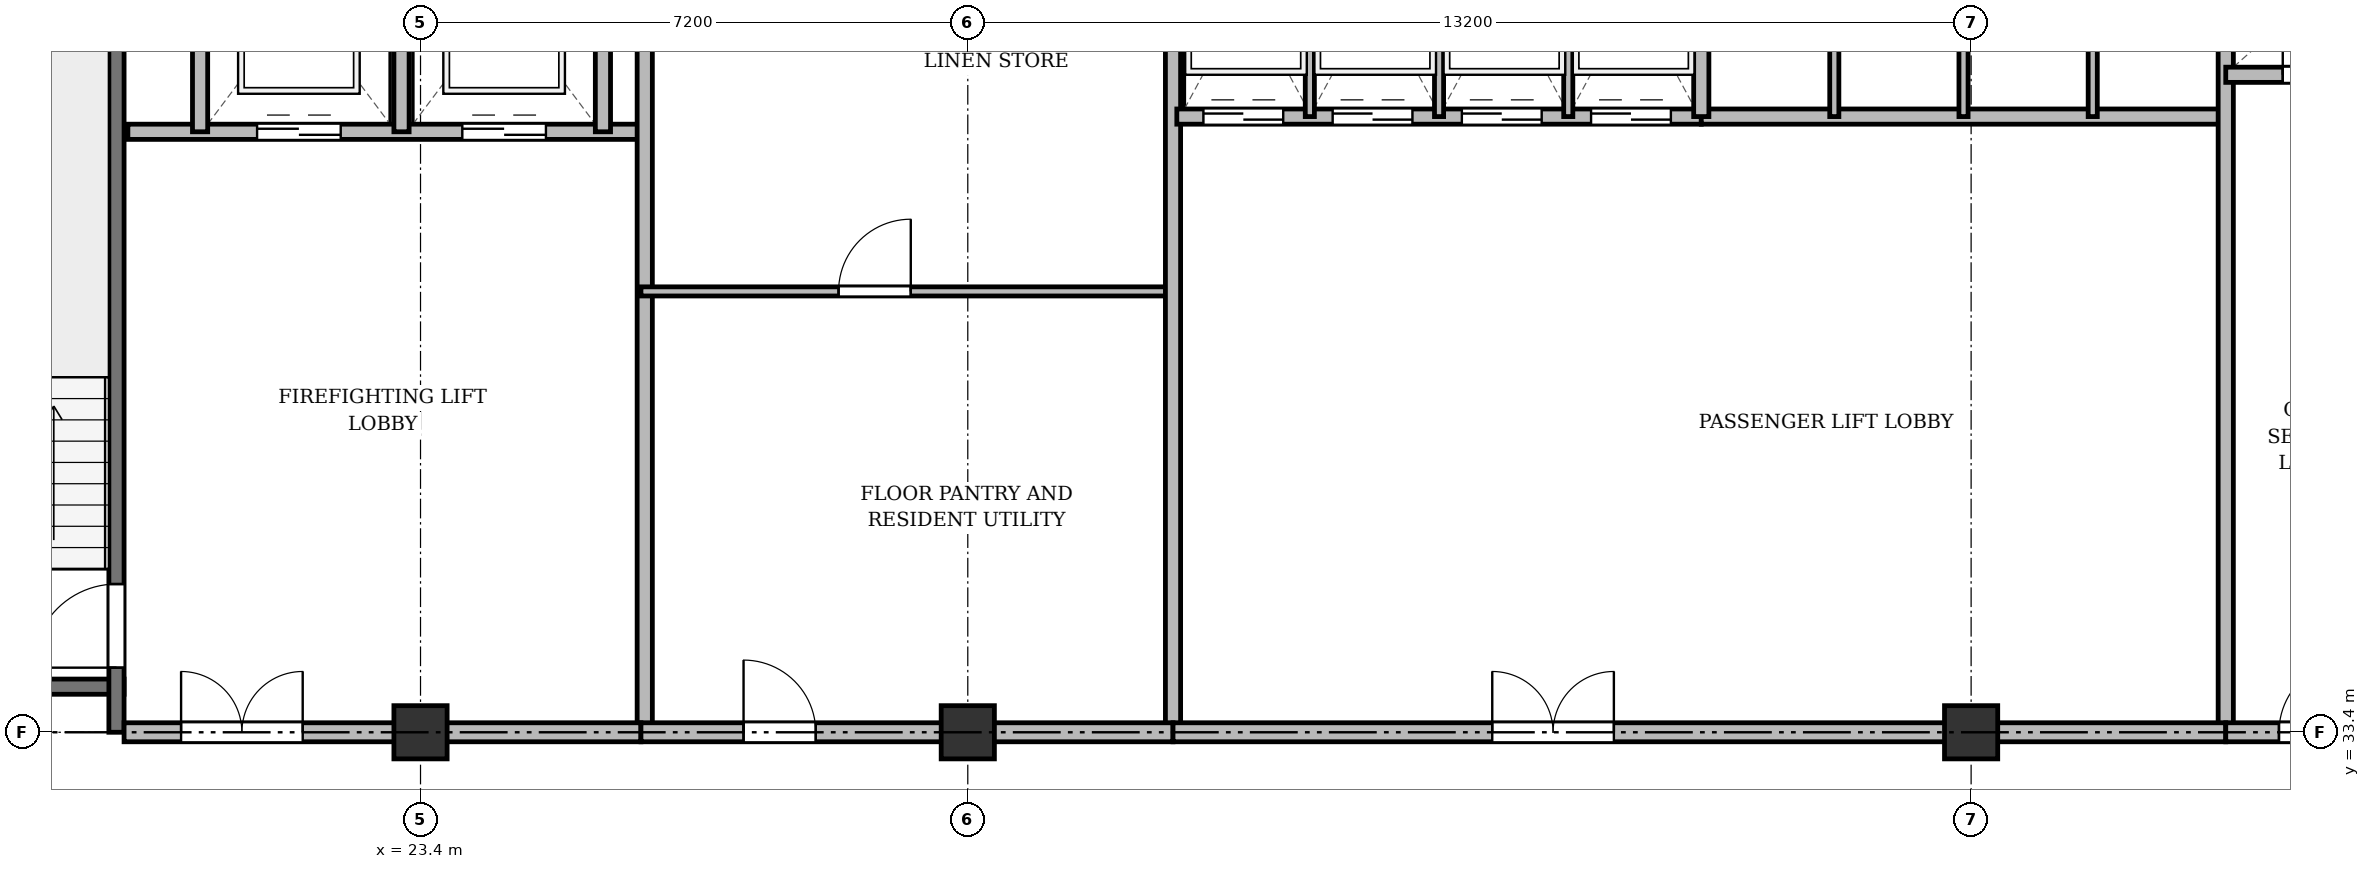
"""IFC4 building model, lengths in metres.
Left out: names, types, materials, properties, quantities, classifications, styles, units other than length and angle.
Written with IfcOpenShell. Run it as: python <this file> out.ifc"""

import sys

from ifc_helpers import new_model, si_unit, direction, frame, frame_2d, origin, origin_2d, place, context, subcontext, project, spatial, rectangle, extrude, source, transform, mapped, element, fill, save


model = new_model("IFC4")
c1 = context("Model", 3, precision=1e-05, world=origin(), true_north=direction((0.0, 1.0)))
c2 = subcontext(c1, "Body", "Model", "MODEL_VIEW")
j1 = project(units=[si_unit("LENGTHUNIT", "METRE"), si_unit("PLANEANGLEUNIT", "RADIAN")], contexts=[c1])
p1 = place(None, origin())
s1 = spatial("IfcSite", under=j1, at=p1, CompositionType="ELEMENT")
p2 = place(p1, origin())
s2 = spatial("IfcBuilding", under=s1, at=p2, CompositionType="ELEMENT")
p3 = place(p2, frame((0.0, 0.0, 201.3)))
s3 = spatial("IfcBuildingStorey", under=s2, at=p3, CompositionType="ELEMENT", Elevation=201.3)
m1 = source(origin(), c2, "Body", "SweptSolid", [
    extrude(rectangle(XDim=0.7, YDim=0.7, at=origin_2d()), origin(), (0.0, 0.0, 1.0), 3.6),
])
for number, where, z_axis, x_axis in (
    (1, (23.4, 33.4, 0.0), (0.0, 0.0, 1.0), (1.0, 0.0, 0.0)),
    (2, (30.6, 33.4, 0.0), (0.0, 0.0, 1.0), (1.0, 0.0, 0.0)),
    (3, (43.8, 33.4, 0.0), (0.0, 0.0, 1.0), (1.0, 0.0, 0.0)),
):
    element("IfcColumn", number, at=place(p3, frame(where, z_axis=z_axis, x_axis=x_axis)), inside=s3, PredefinedType="COLUMN", context=c2, shape_type="MappedRepresentation", body=[
        mapped(m1, transform((0.0, 0.0, 0.0), x_axis=(1.0, 0.0, 0.0), y_axis=(0.0, 1.0, 0.0), z_axis=(0.0, 0.0, 1.0), scale=1.0)),
    ])
p4 = place(p3, frame((16.1, 34.0, 0.0), z_axis=(0.0, 0.0, 1.0), x_axis=(1.0, 0.0, 0.0)))
e4 = element("IfcWall", 4, at=p4, inside=s3, PredefinedType="SHEAR", context=c2, shape_type="SweptSolid", body=[
    extrude(rectangle(XDim=3.4, YDim=0.2, at=frame_2d((1.7, 0.0))), origin(), (0.0, 0.0, 1.0), 3.22),
])
p5 = place(p3, frame((19.4, 33.4, 0.0), z_axis=(0.0, 0.0, 1.0), x_axis=(0.0, 1.0, 0.0)))
e5 = element("IfcWall", 5, at=p5, inside=s3, PredefinedType="SHEAR", context=c2, shape_type="SweptSolid", body=[
    extrude(rectangle(XDim=11.1, YDim=0.2, at=frame_2d((5.55, 0.0))), origin(), (0.0, 0.0, 1.0), 3.22),
])
p6 = place(p5, frame((0.85, 0.0, 0.0)))
e6 = element("IfcOpeningElement", 6, at=p6, cuts=e5, PredefinedType="OPENING", context=c2, shape_type="SweptSolid", body=[
    extrude(rectangle(XDim=1.1, YDim=2.15, at=frame_2d((0.55, 1.075))), frame((0.0, 0.11, 0.0), z_axis=(0.0, -1.0, 0.0), x_axis=(1.0, 0.0, 0.0)), (0.0, 0.0, 1.0), 0.22),
])
p7 = place(p3, frame((19.55, 41.3, 0.0), z_axis=(0.0, 0.0, 1.0), x_axis=(1.0, 0.0, 0.0)))
e7 = element("IfcWall", 7, at=p7, inside=s3, PredefinedType="SOLIDWALL", context=c2, shape_type="SweptSolid", body=[
    extrude(rectangle(XDim=6.75, YDim=0.2, at=frame_2d((3.375, 0.0))), origin(), (0.0, 0.0, 1.0), 3.22),
])
p8 = place(p7, frame((1.7, 0.0, 0.0)))
e8 = element("IfcOpeningElement", 8, at=p8, cuts=e7, PredefinedType="OPENING", context=c2, shape_type="SweptSolid", body=[
    extrude(rectangle(XDim=1.1, YDim=2.15, at=frame_2d((0.55, 1.075))), frame((0.0, 0.11, 0.0), z_axis=(0.0, -1.0, 0.0), x_axis=(1.0, 0.0, 0.0)), (0.0, 0.0, 1.0), 0.22),
])
p9 = place(p7, frame((4.4, 0.0, 0.0)))
e9 = element("IfcOpeningElement", 9, at=p9, cuts=e7, PredefinedType="OPENING", context=c2, shape_type="SweptSolid", body=[
    extrude(rectangle(XDim=1.1, YDim=2.15, at=frame_2d((0.55, 1.075))), frame((0.0, 0.11, 0.0), z_axis=(0.0, -1.0, 0.0), x_axis=(1.0, 0.0, 0.0)), (0.0, 0.0, 1.0), 0.22),
])
for number, where, z_axis, x_axis in (
    (10, (20.5, 41.3, 0.0), (0.0, 0.0, 1.0), (0.0, 1.0, 0.0)),
    (11, (23.15, 41.3, 0.0), (0.0, 0.0, 1.0), (0.0, 1.0, 0.0)),
    (12, (25.8, 41.3, 0.0), (0.0, 0.0, 1.0), (0.0, 1.0, 0.0)),
):
    element("IfcWall", number, at=place(p3, frame(where, z_axis=z_axis, x_axis=x_axis)), inside=s3, PredefinedType="SOLIDWALL", context=c2, shape_type="SweptSolid", body=[
        extrude(rectangle(XDim=3.4, YDim=0.2, at=frame_2d((1.7, 0.0))), origin(), (0.0, 0.0, 1.0), 3.22),
    ])
p10 = place(p3, frame((26.35, 33.4, 0.0), z_axis=(0.0, 0.0, 1.0), x_axis=(0.0, 1.0, 0.0)))
e13 = element("IfcWall", 13, at=p10, inside=s3, PredefinedType="SOLIDWALL", context=c2, shape_type="SweptSolid", body=[
    extrude(rectangle(XDim=11.3, YDim=0.2, at=frame_2d((5.65, 0.0))), origin(), (0.0, 0.0, 1.0), 2.77),
])
p11 = place(p3, frame((19.5, 33.4, 0.0), z_axis=(0.0, 0.0, 1.0), x_axis=(1.0, 0.0, 0.0)))
e14 = element("IfcWall", 14, at=p11, inside=s3, PredefinedType="PARTITIONING", context=c2, shape_type="SweptSolid", body=[
    extrude(rectangle(XDim=6.8, YDim=0.25, at=frame_2d((3.4, 0.0))), origin(), (0.0, 0.0, 1.0), 2.77),
])
p12 = place(p11, frame((0.75, 0.0, 0.0)))
e15 = element("IfcOpeningElement", 15, at=p12, cuts=e14, PredefinedType="OPENING", context=c2, shape_type="SweptSolid", body=[
    extrude(rectangle(XDim=1.6, YDim=2.2, at=frame_2d((0.8, 1.1))), frame((0.0, 0.135, 0.0), z_axis=(0.0, -1.0, 0.0), x_axis=(1.0, 0.0, 0.0)), (0.0, 0.0, 1.0), 0.27),
])
p13 = place(p3, frame((26.3, 39.2, 0.0), z_axis=(0.0, 0.0, 1.0), x_axis=(1.0, 0.0, 0.0)))
e16 = element("IfcWall", 16, at=p13, inside=s3, PredefinedType="PARTITIONING", context=c2, shape_type="SweptSolid", body=[
    extrude(rectangle(XDim=7.0, YDim=0.12, at=frame_2d((3.5, 0.0))), origin(), (0.0, 0.0, 1.0), 2.72),
])
p14 = place(p13, frame((2.6, 0.0, 0.0)))
e17 = element("IfcOpeningElement", 17, at=p14, cuts=e16, PredefinedType="OPENING", context=c2, shape_type="SweptSolid", body=[
    extrude(rectangle(XDim=0.95, YDim=2.15, at=frame_2d((0.475, 1.075))), frame((0.0, 0.07, 0.0), z_axis=(0.0, -1.0, 0.0), x_axis=(1.0, 0.0, 0.0)), (0.0, 0.0, 1.0), 0.14),
])
p15 = place(p3, frame((33.3, 33.4, 0.0), z_axis=(0.0, 0.0, 1.0), x_axis=(0.0, 1.0, 0.0)))
e18 = element("IfcWall", 18, at=p15, inside=s3, PredefinedType="SOLIDWALL", context=c2, shape_type="SweptSolid", body=[
    extrude(rectangle(XDim=11.3, YDim=0.2, at=frame_2d((5.65, 0.0))), origin(), (0.0, 0.0, 1.0), 2.77),
])
p16 = place(p3, frame((33.35, 41.5, 0.0), z_axis=(0.0, 0.0, 1.0), x_axis=(1.0, 0.0, 0.0)))
e19 = element("IfcWall", 19, at=p16, inside=s3, PredefinedType="SOLIDWALL", context=c2, shape_type="SweptSolid", body=[
    extrude(rectangle(XDim=6.9, YDim=0.2, at=frame_2d((3.45, 0.0))), origin(), (0.0, 0.0, 1.0), 3.22),
])
p17 = place(p16, frame((0.35, 0.0, 0.0)))
e20 = element("IfcOpeningElement", 20, at=p17, cuts=e19, PredefinedType="OPENING", context=c2, shape_type="SweptSolid", body=[
    extrude(rectangle(XDim=1.05, YDim=2.15, at=frame_2d((0.525, 1.075))), frame((0.0, 0.11, 0.0), z_axis=(0.0, -1.0, 0.0), x_axis=(1.0, 0.0, 0.0)), (0.0, 0.0, 1.0), 0.22),
])
p18 = place(p16, frame((2.05, 0.0, 0.0)))
e21 = element("IfcOpeningElement", 21, at=p18, cuts=e19, PredefinedType="OPENING", context=c2, shape_type="SweptSolid", body=[
    extrude(rectangle(XDim=1.05, YDim=2.15, at=frame_2d((0.525, 1.075))), frame((0.0, 0.11, 0.0), z_axis=(0.0, -1.0, 0.0), x_axis=(1.0, 0.0, 0.0)), (0.0, 0.0, 1.0), 0.22),
])
p19 = place(p16, frame((3.75, 0.0, 0.0)))
e22 = element("IfcOpeningElement", 22, at=p19, cuts=e19, PredefinedType="OPENING", context=c2, shape_type="SweptSolid", body=[
    extrude(rectangle(XDim=1.05, YDim=2.15, at=frame_2d((0.525, 1.075))), frame((0.0, 0.11, 0.0), z_axis=(0.0, -1.0, 0.0), x_axis=(1.0, 0.0, 0.0)), (0.0, 0.0, 1.0), 0.22),
])
p20 = place(p16, frame((5.45, 0.0, 0.0)))
e23 = element("IfcOpeningElement", 23, at=p20, cuts=e19, PredefinedType="OPENING", context=c2, shape_type="SweptSolid", body=[
    extrude(rectangle(XDim=1.05, YDim=2.15, at=frame_2d((0.525, 1.075))), frame((0.0, 0.11, 0.0), z_axis=(0.0, -1.0, 0.0), x_axis=(1.0, 0.0, 0.0)), (0.0, 0.0, 1.0), 0.22),
])
for number, where, z_axis, x_axis in (
    (24, (35.1, 41.5, 0.0), (0.0, 0.0, 1.0), (0.0, 1.0, 0.0)),
    (25, (36.8, 41.5, 0.0), (0.0, 0.0, 1.0), (0.0, 1.0, 0.0)),
    (26, (38.5, 41.5, 0.0), (0.0, 0.0, 1.0), (0.0, 1.0, 0.0)),
):
    element("IfcWall", number, at=place(p3, frame(where, z_axis=z_axis, x_axis=x_axis)), inside=s3, PredefinedType="PARTITIONING", context=c2, shape_type="SweptSolid", body=[
        extrude(rectangle(XDim=3.2, YDim=0.12, at=frame_2d((1.6, 0.0))), origin(), (0.0, 0.0, 1.0), 3.22),
    ])
p21 = place(p3, frame((40.25, 41.5, 0.0), z_axis=(0.0, 0.0, 1.0), x_axis=(1.0, 0.0, 0.0)))
e27 = element("IfcWall", 27, at=p21, inside=s3, PredefinedType="SOLIDWALL", context=c2, shape_type="SweptSolid", body=[
    extrude(rectangle(XDim=6.9, YDim=0.2, at=frame_2d((3.45, 0.0))), origin(), (0.0, 0.0, 1.0), 2.72),
])
p22 = place(p3, frame((40.25, 41.5, 0.0), z_axis=(0.0, 0.0, 1.0), x_axis=(0.0, 1.0, 0.0)))
e28 = element("IfcWall", 28, at=p22, inside=s3, PredefinedType="SOLIDWALL", context=c2, shape_type="SweptSolid", body=[
    extrude(rectangle(XDim=3.2, YDim=0.2, at=frame_2d((1.6, 0.0))), origin(), (0.0, 0.0, 1.0), 3.22),
])
p23 = place(p3, frame((42.0, 41.5, 0.0), z_axis=(0.0, 0.0, 1.0), x_axis=(0.0, 1.0, 0.0)))
e29 = element("IfcWall", 29, at=p23, inside=s3, PredefinedType="PARTITIONING", context=c2, shape_type="SweptSolid", body=[
    extrude(rectangle(XDim=3.2, YDim=0.12, at=frame_2d((1.6, 0.0))), origin(), (0.0, 0.0, 1.0), 3.22),
])
p24 = place(p3, frame((43.7, 41.5, 0.0), z_axis=(0.0, 0.0, 1.0), x_axis=(0.0, 1.0, 0.0)))
e30 = element("IfcWall", 30, at=p24, inside=s3, PredefinedType="PARTITIONING", context=c2, shape_type="SweptSolid", body=[
    extrude(rectangle(XDim=3.2, YDim=0.12, at=frame_2d((1.6, 0.0))), origin(), (0.0, 0.0, 1.0), 2.72),
])
p25 = place(p3, frame((45.4, 41.5, 0.0), z_axis=(0.0, 0.0, 1.0), x_axis=(0.0, 1.0, 0.0)))
e31 = element("IfcWall", 31, at=p25, inside=s3, PredefinedType="PARTITIONING", context=c2, shape_type="SweptSolid", body=[
    extrude(rectangle(XDim=3.2, YDim=0.12, at=frame_2d((1.6, 0.0))), origin(), (0.0, 0.0, 1.0), 3.22),
])
p26 = place(p3, frame((47.15, 33.4, 0.0), z_axis=(0.0, 0.0, 1.0), x_axis=(0.0, 1.0, 0.0)))
e32 = element("IfcWall", 32, at=p26, inside=s3, PredefinedType="SOLIDWALL", context=c2, shape_type="SweptSolid", body=[
    extrude(rectangle(XDim=11.3, YDim=0.2, at=frame_2d((5.65, 0.0))), origin(), (0.0, 0.0, 1.0), 2.77),
])
p27 = place(p3, frame((26.3, 33.4, 0.0), z_axis=(0.0, 0.0, 1.0), x_axis=(1.0, 0.0, 0.0)))
e33 = element("IfcWall", 33, at=p27, inside=s3, PredefinedType="PARTITIONING", context=c2, shape_type="SweptSolid", body=[
    extrude(rectangle(XDim=7.0, YDim=0.25, at=frame_2d((3.5, 0.0))), origin(), (0.0, 0.0, 1.0), 2.77),
])
p28 = place(p27, frame((1.35, 0.0, 0.0)))
e34 = element("IfcOpeningElement", 34, at=p28, cuts=e33, PredefinedType="OPENING", context=c2, shape_type="SweptSolid", body=[
    extrude(rectangle(XDim=0.95, YDim=2.15, at=frame_2d((0.475, 1.075))), frame((0.0, 0.135, 0.0), z_axis=(0.0, -1.0, 0.0), x_axis=(1.0, 0.0, 0.0)), (0.0, 0.0, 1.0), 0.27),
])
p29 = place(p3, frame((33.3, 33.4, 0.0), z_axis=(0.0, 0.0, 1.0), x_axis=(1.0, 0.0, 0.0)))
e35 = element("IfcWall", 35, at=p29, inside=s3, PredefinedType="PARTITIONING", context=c2, shape_type="SweptSolid", body=[
    extrude(rectangle(XDim=13.85, YDim=0.25, at=frame_2d((6.925, 0.0))), origin(), (0.0, 0.0, 1.0), 2.77),
])
p30 = place(p29, frame((4.2, 0.0, 0.0)))
e36 = element("IfcOpeningElement", 36, at=p30, cuts=e35, PredefinedType="OPENING", context=c2, shape_type="SweptSolid", body=[
    extrude(rectangle(XDim=1.6, YDim=2.2, at=frame_2d((0.8, 1.1))), frame((0.0, 0.135, 0.0), z_axis=(0.0, -1.0, 0.0), x_axis=(1.0, 0.0, 0.0)), (0.0, 0.0, 1.0), 0.27),
])
p31 = place(p3, frame((47.15, 42.05, 0.0), z_axis=(0.0, 0.0, 1.0), x_axis=(1.0, 0.0, 0.0)))
e37 = element("IfcWall", 37, at=p31, inside=s3, PredefinedType="SOLIDWALL", context=c2, shape_type="SweptSolid", body=[
    extrude(rectangle(XDim=7.85, YDim=0.2, at=frame_2d((3.925, 0.0))), origin(), (0.0, 0.0, 1.0), 2.72),
])
p32 = place(p31, frame((0.75, 0.0, 0.0)))
e38 = element("IfcOpeningElement", 38, at=p32, cuts=e37, PredefinedType="OPENING", context=c2, shape_type="SweptSolid", body=[
    extrude(rectangle(XDim=0.9, YDim=2.1, at=frame_2d((0.45, 1.05))), frame((0.0, 0.11, 0.0), z_axis=(0.0, -1.0, 0.0), x_axis=(1.0, 0.0, 0.0)), (0.0, 0.0, 1.0), 0.22),
])
p33 = place(p31, frame((3.85, 0.0, 0.0)))
e39 = element("IfcOpeningElement", 39, at=p33, cuts=e37, PredefinedType="OPENING", context=c2, shape_type="SweptSolid", body=[
    extrude(rectangle(XDim=0.9, YDim=2.1, at=frame_2d((0.45, 1.05))), frame((0.0, 0.11, 0.0), z_axis=(0.0, -1.0, 0.0), x_axis=(1.0, 0.0, 0.0)), (0.0, 0.0, 1.0), 0.22),
])
p34 = place(p3, frame((47.15, 33.4, 0.0), z_axis=(0.0, 0.0, 1.0), x_axis=(1.0, 0.0, 0.0)))
e40 = element("IfcWall", 40, at=p34, inside=s3, PredefinedType="PARTITIONING", context=c2, shape_type="SweptSolid", body=[
    extrude(rectangle(XDim=11.15, YDim=0.25, at=frame_2d((5.575, 0.0))), origin(), (0.0, 0.0, 1.0), 2.77),
])
p35 = place(p34, frame((0.7, 0.0, 0.0)))
e41 = element("IfcOpeningElement", 41, at=p35, cuts=e40, PredefinedType="OPENING", context=c2, shape_type="SweptSolid", body=[
    extrude(rectangle(XDim=0.95, YDim=2.15, at=frame_2d((0.475, 1.075))), frame((0.0, 0.135, 0.0), z_axis=(0.0, -1.0, 0.0), x_axis=(1.0, 0.0, 0.0)), (0.0, 0.0, 1.0), 0.27),
])
p36 = place(p34, frame((6.0, 0.0, 0.0)))
e42 = element("IfcOpeningElement", 42, at=p36, cuts=e40, PredefinedType="OPENING", context=c2, shape_type="SweptSolid", body=[
    extrude(rectangle(XDim=1.2, YDim=2.15, at=frame_2d((0.6, 1.075))), frame((0.0, 0.135, 0.0), z_axis=(0.0, -1.0, 0.0), x_axis=(1.0, 0.0, 0.0)), (0.0, 0.0, 1.0), 0.27),
])
m2 = source(origin(), c2, "Body", "SweptSolid", [
    extrude(rectangle(XDim=1.1, YDim=2.15, at=frame_2d((0.55, 1.075))), frame((0.0, 0.025, 0.0), z_axis=(0.0, -1.0, 0.0), x_axis=(1.0, 0.0, 0.0)), (0.0, 0.0, 1.0), 0.05),
])
p37 = place(p6, origin())
e43 = element("IfcDoor", 43, at=p37, inside=s3, OperationType="SINGLE_SWING_LEFT", PredefinedType="DOOR", context=c2, shape_type="MappedRepresentation", body=[
    mapped(m2, transform((0.0, 0.0, 0.0), x_axis=(1.0, 0.0, 0.0), y_axis=(0.0, 1.0, 0.0), z_axis=(0.0, 0.0, 1.0), scale=1.0)),
])
fill(e6, e43)
p38 = place(p8, origin())
e44 = element("IfcDoor", 44, at=p38, inside=s3, OperationType="DOUBLE_DOOR_SLIDING", PredefinedType="DOOR", context=c2, shape_type="MappedRepresentation", body=[
    mapped(m2, transform((0.0, 0.0, 0.0), x_axis=(1.0, 0.0, 0.0), y_axis=(0.0, 1.0, 0.0), z_axis=(0.0, 0.0, 1.0), scale=1.0)),
])
fill(e8, e44)
p39 = place(p9, origin())
e45 = element("IfcDoor", 45, at=p39, inside=s3, OperationType="DOUBLE_DOOR_SLIDING", PredefinedType="DOOR", context=c2, shape_type="MappedRepresentation", body=[
    mapped(m2, transform((0.0, 0.0, 0.0), x_axis=(1.0, 0.0, 0.0), y_axis=(0.0, 1.0, 0.0), z_axis=(0.0, 0.0, 1.0), scale=1.0)),
])
fill(e9, e45)
m3 = source(origin(), c2, "Body", "SweptSolid", [
    extrude(rectangle(XDim=1.6, YDim=2.2, at=frame_2d((0.8, 1.1))), frame((0.0, 0.025, 0.0), z_axis=(0.0, -1.0, 0.0), x_axis=(1.0, 0.0, 0.0)), (0.0, 0.0, 1.0), 0.05),
])
p40 = place(p12, origin())
e46 = element("IfcDoor", 46, at=p40, inside=s3, OperationType="DOUBLE_DOOR_SINGLE_SWING", PredefinedType="DOOR", context=c2, shape_type="MappedRepresentation", body=[
    mapped(m3, transform((0.0, 0.0, 0.0), x_axis=(1.0, 0.0, 0.0), y_axis=(0.0, 1.0, 0.0), z_axis=(0.0, 0.0, 1.0), scale=1.0)),
])
fill(e15, e46)
m4 = source(origin(), c2, "Body", "SweptSolid", [
    extrude(rectangle(XDim=0.95, YDim=2.15, at=frame_2d((0.475, 1.075))), frame((0.0, 0.025, 0.0), z_axis=(0.0, -1.0, 0.0), x_axis=(1.0, 0.0, 0.0)), (0.0, 0.0, 1.0), 0.05),
])
p41 = place(p14, origin())
e47 = element("IfcDoor", 47, at=p41, inside=s3, OperationType="SINGLE_SWING_RIGHT", PredefinedType="DOOR", context=c2, shape_type="MappedRepresentation", body=[
    mapped(m4, transform((0.0, 0.0, 0.0), x_axis=(1.0, 0.0, 0.0), y_axis=(0.0, 1.0, 0.0), z_axis=(0.0, 0.0, 1.0), scale=1.0)),
])
fill(e17, e47)
m5 = source(origin(), c2, "Body", "SweptSolid", [
    extrude(rectangle(XDim=1.05, YDim=2.15, at=frame_2d((0.525, 1.075))), frame((0.0, 0.025, 0.0), z_axis=(0.0, -1.0, 0.0), x_axis=(1.0, 0.0, 0.0)), (0.0, 0.0, 1.0), 0.05),
])
p42 = place(p17, origin())
e48 = element("IfcDoor", 48, at=p42, inside=s3, OperationType="DOUBLE_DOOR_SLIDING", PredefinedType="DOOR", context=c2, shape_type="MappedRepresentation", body=[
    mapped(m5, transform((0.0, 0.0, 0.0), x_axis=(1.0, 0.0, 0.0), y_axis=(0.0, 1.0, 0.0), z_axis=(0.0, 0.0, 1.0), scale=1.0)),
])
fill(e20, e48)
p43 = place(p18, origin())
e49 = element("IfcDoor", 49, at=p43, inside=s3, OperationType="DOUBLE_DOOR_SLIDING", PredefinedType="DOOR", context=c2, shape_type="MappedRepresentation", body=[
    mapped(m5, transform((0.0, 0.0, 0.0), x_axis=(1.0, 0.0, 0.0), y_axis=(0.0, 1.0, 0.0), z_axis=(0.0, 0.0, 1.0), scale=1.0)),
])
fill(e21, e49)
p44 = place(p19, origin())
e50 = element("IfcDoor", 50, at=p44, inside=s3, OperationType="DOUBLE_DOOR_SLIDING", PredefinedType="DOOR", context=c2, shape_type="MappedRepresentation", body=[
    mapped(m5, transform((0.0, 0.0, 0.0), x_axis=(1.0, 0.0, 0.0), y_axis=(0.0, 1.0, 0.0), z_axis=(0.0, 0.0, 1.0), scale=1.0)),
])
fill(e22, e50)
p45 = place(p20, origin())
e51 = element("IfcDoor", 51, at=p45, inside=s3, OperationType="DOUBLE_DOOR_SLIDING", PredefinedType="DOOR", context=c2, shape_type="MappedRepresentation", body=[
    mapped(m5, transform((0.0, 0.0, 0.0), x_axis=(1.0, 0.0, 0.0), y_axis=(0.0, 1.0, 0.0), z_axis=(0.0, 0.0, 1.0), scale=1.0)),
])
fill(e23, e51)
p46 = place(p28, origin())
e52 = element("IfcDoor", 52, at=p46, inside=s3, OperationType="SINGLE_SWING_LEFT", PredefinedType="DOOR", context=c2, shape_type="MappedRepresentation", body=[
    mapped(m4, transform((0.0, 0.0, 0.0), x_axis=(1.0, 0.0, 0.0), y_axis=(0.0, 1.0, 0.0), z_axis=(0.0, 0.0, 1.0), scale=1.0)),
])
fill(e34, e52)
p47 = place(p30, origin())
e53 = element("IfcDoor", 53, at=p47, inside=s3, OperationType="DOUBLE_DOOR_SINGLE_SWING", PredefinedType="DOOR", context=c2, shape_type="MappedRepresentation", body=[
    mapped(m3, transform((0.0, 0.0, 0.0), x_axis=(1.0, 0.0, 0.0), y_axis=(0.0, 1.0, 0.0), z_axis=(0.0, 0.0, 1.0), scale=1.0)),
])
fill(e36, e53)
m6 = source(origin(), c2, "Body", "SweptSolid", [
    extrude(rectangle(XDim=0.9, YDim=2.1, at=frame_2d((0.45, 1.05))), frame((0.0, 0.025, 0.0), z_axis=(0.0, -1.0, 0.0), x_axis=(1.0, 0.0, 0.0)), (0.0, 0.0, 1.0), 0.05),
])
p48 = place(p32, origin())
e54 = element("IfcDoor", 54, at=p48, inside=s3, OperationType="SINGLE_SWING_LEFT", PredefinedType="DOOR", context=c2, shape_type="MappedRepresentation", body=[
    mapped(m6, transform((0.0, 0.0, 0.0), x_axis=(1.0, 0.0, 0.0), y_axis=(0.0, 1.0, 0.0), z_axis=(0.0, 0.0, 1.0), scale=1.0)),
])
fill(e38, e54)
p49 = place(p35, origin())
e55 = element("IfcDoor", 55, at=p49, inside=s3, OperationType="SINGLE_SWING_RIGHT", PredefinedType="DOOR", context=c2, shape_type="MappedRepresentation", body=[
    mapped(m4, transform((0.0, 0.0, 0.0), x_axis=(1.0, 0.0, 0.0), y_axis=(0.0, 1.0, 0.0), z_axis=(0.0, 0.0, 1.0), scale=1.0)),
])
fill(e41, e55)
save(model, sys.argv[1])
